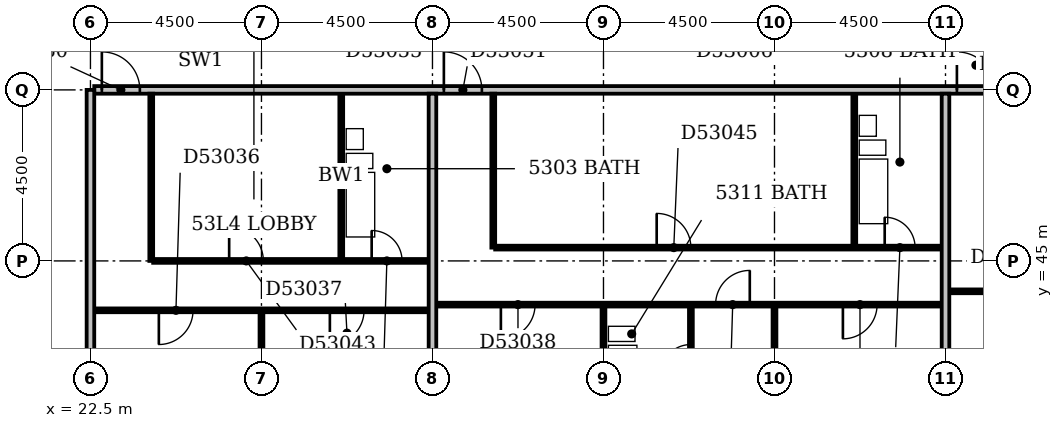
"""IFC4 building model, lengths in metres.
Left out: names, types, materials, properties, quantities, classifications, styles, units other than length and angle.
Written with IfcOpenShell. Run it as: python <this file> out.ifc"""

import sys

from ifc_helpers import new_model, si_unit, direction, frame, frame_2d, origin, place, context, subcontext, project, spatial, rectangle, extrude, element, fill, save


model = new_model("IFC4")
c1 = context("Model", 3, precision=1e-05, world=origin(), true_north=direction((0.0, 1.0)))
c2 = subcontext(c1, "Body", "Model", "MODEL_VIEW")
j1 = project(units=[si_unit("LENGTHUNIT", "METRE"), si_unit("PLANEANGLEUNIT", "RADIAN")], contexts=[c1])
p1 = place(None, origin())
s1 = spatial("IfcSite", under=j1, at=p1, CompositionType="ELEMENT")
p2 = place(p1, origin())
s2 = spatial("IfcBuilding", under=s1, at=p2, CompositionType="ELEMENT")
p3 = place(p2, frame((0.0, 0.0, 207.8)))
s3 = spatial("IfcBuildingStorey", under=s2, at=p3, CompositionType="ELEMENT", Elevation=207.8)
p4 = place(p3, frame((22.5, 36.45, 0.0), z_axis=(0.0, 0.0, 1.0), x_axis=(0.0, 1.0, 0.0)))
e1 = element("IfcWall", 1, at=p4, inside=s3, PredefinedType="PARTITIONING", context=c2, shape_type="SweptSolid", body=[
    extrude(rectangle(XDim=13.05, YDim=0.2, at=frame_2d((6.525, 0.0))), origin(), (0.0, 0.0, 1.0), 3.25),
])
p5 = place(p3, frame((27.0, 36.45, 0.0), z_axis=(0.0, 0.0, 1.0), x_axis=(0.0, 1.0, 0.0)))
e2 = element("IfcWall", 2, at=p5, inside=s3, PredefinedType="PARTITIONING", context=c2, shape_type="SweptSolid", body=[
    extrude(rectangle(XDim=7.2, YDim=0.1, at=frame_2d((3.6, 0.0))), origin(), (0.0, 0.0, 1.0), 2.35),
])
p6 = place(p3, frame((31.5, 36.45, 0.0), z_axis=(0.0, 0.0, 1.0), x_axis=(0.0, 1.0, 0.0)))
e3 = element("IfcWall", 3, at=p6, inside=s3, PredefinedType="PARTITIONING", context=c2, shape_type="SweptSolid", body=[
    extrude(rectangle(XDim=12.95, YDim=0.2, at=frame_2d((6.475, 0.0))), origin(), (0.0, 0.0, 1.0), 3.25),
])
p7 = place(p3, frame((36.0, 36.45, 0.0), z_axis=(0.0, 0.0, 1.0), x_axis=(0.0, 1.0, 0.0)))
e4 = element("IfcWall", 4, at=p7, inside=s3, PredefinedType="PARTITIONING", context=c2, shape_type="SweptSolid", body=[
    extrude(rectangle(XDim=7.35, YDim=0.1, at=frame_2d((3.675, 0.0))), origin(), (0.0, 0.0, 1.0), 2.35),
])
p8 = place(p3, frame((40.5, 36.45, 0.0), z_axis=(0.0, 0.0, 1.0), x_axis=(0.0, 1.0, 0.0)))
e5 = element("IfcWall", 5, at=p8, inside=s3, PredefinedType="PARTITIONING", context=c2, shape_type="SweptSolid", body=[
    extrude(rectangle(XDim=7.35, YDim=0.1, at=frame_2d((3.675, 0.0))), origin(), (0.0, 0.0, 1.0), 3.25),
])
p9 = place(p3, frame((45.0, 36.45, 0.0), z_axis=(0.0, 0.0, 1.0), x_axis=(0.0, 1.0, 0.0)))
e6 = element("IfcWall", 6, at=p9, inside=s3, PredefinedType="PARTITIONING", context=c2, shape_type="SweptSolid", body=[
    extrude(rectangle(XDim=12.95, YDim=0.2, at=frame_2d((6.475, 0.0))), origin(), (0.0, 0.0, 1.0), 2.55),
])
p10 = place(p3, frame((38.3, 40.95, 0.0), z_axis=(0.0, 0.0, 1.0), x_axis=(0.0, 1.0, 0.0)))
e7 = element("IfcWall", 7, at=p10, inside=s3, PredefinedType="PLUMBINGWALL", context=c2, shape_type="SweptSolid", body=[
    extrude(rectangle(XDim=2.85, YDim=0.1, at=frame_2d((1.425, 0.0))), origin(), (0.0, 0.0, 1.0), 3.25),
])
p11 = place(p10, frame((1.05, 0.0, 0.0)))
e8 = element("IfcOpeningElement", 8, at=p11, cuts=e7, PredefinedType="OPENING", context=c2, shape_type="SweptSolid", body=[
    extrude(rectangle(XDim=0.8, YDim=2.1, at=frame_2d((0.4, 1.05))), frame((0.0, 0.062, 0.0), z_axis=(0.0, -1.0, 0.0), x_axis=(1.0, 0.0, 0.0)), (0.0, 0.0, 1.0), 0.124),
])
p12 = place(p3, frame((22.6, 43.7, 0.0), z_axis=(0.0, 0.0, 1.0), x_axis=(1.0, 0.0, 0.0)))
e9 = element("IfcWall", 9, at=p12, inside=s3, PredefinedType="PARTITIONING", context=c2, shape_type="SweptSolid", body=[
    extrude(rectangle(XDim=8.8, YDim=0.1, at=frame_2d((4.4, 0.0))), origin(), (0.0, 0.0, 1.0), 3.25),
])
p13 = place(p12, frame((1.7, 0.0, 0.0)))
e10 = element("IfcOpeningElement", 10, at=p13, cuts=e9, PredefinedType="OPENING", context=c2, shape_type="SweptSolid", body=[
    extrude(rectangle(XDim=0.9, YDim=2.1, at=frame_2d((0.45, 1.05))), frame((0.0, 0.062, 0.0), z_axis=(0.0, -1.0, 0.0), x_axis=(1.0, 0.0, 0.0)), (0.0, 0.0, 1.0), 0.124),
])
p14 = place(p12, frame((6.2, 0.0, 0.0)))
e11 = element("IfcOpeningElement", 11, at=p14, cuts=e9, PredefinedType="OPENING", context=c2, shape_type="SweptSolid", body=[
    extrude(rectangle(XDim=0.9, YDim=2.1, at=frame_2d((0.45, 1.05))), frame((0.0, 0.062, 0.0), z_axis=(0.0, -1.0, 0.0), x_axis=(1.0, 0.0, 0.0)), (0.0, 0.0, 1.0), 0.124),
])
p15 = place(p3, frame((31.6, 43.85, 0.0), z_axis=(0.0, 0.0, 1.0), x_axis=(1.0, 0.0, 0.0)))
e12 = element("IfcWall", 12, at=p15, inside=s3, PredefinedType="PARTITIONING", context=c2, shape_type="SweptSolid", body=[
    extrude(rectangle(XDim=13.3, YDim=0.1, at=frame_2d((6.65, 0.0))), origin(), (0.0, 0.0, 1.0), 3.25),
])
p16 = place(p15, frame((1.7, 0.0, 0.0)))
e13 = element("IfcOpeningElement", 13, at=p16, cuts=e12, PredefinedType="OPENING", context=c2, shape_type="SweptSolid", body=[
    extrude(rectangle(XDim=0.9, YDim=2.1, at=frame_2d((0.45, 1.05))), frame((0.0, 0.062, 0.0), z_axis=(0.0, -1.0, 0.0), x_axis=(1.0, 0.0, 0.0)), (0.0, 0.0, 1.0), 0.124),
])
p17 = place(p15, frame((7.35, 0.0, 0.0)))
e14 = element("IfcOpeningElement", 14, at=p17, cuts=e12, PredefinedType="OPENING", context=c2, shape_type="SweptSolid", body=[
    extrude(rectangle(XDim=0.9, YDim=2.1, at=frame_2d((0.45, 1.05))), frame((0.0, 0.062, 0.0), z_axis=(0.0, -1.0, 0.0), x_axis=(1.0, 0.0, 0.0)), (0.0, 0.0, 1.0), 0.124),
])
p18 = place(p15, frame((10.7, 0.0, 0.0)))
e15 = element("IfcOpeningElement", 15, at=p18, cuts=e12, PredefinedType="OPENING", context=c2, shape_type="SweptSolid", body=[
    extrude(rectangle(XDim=0.9, YDim=2.1, at=frame_2d((0.45, 1.05))), frame((0.0, 0.062, 0.0), z_axis=(0.0, -1.0, 0.0), x_axis=(1.0, 0.0, 0.0)), (0.0, 0.0, 1.0), 0.124),
])
p19 = place(p3, frame((45.1, 44.2, 0.0), z_axis=(0.0, 0.0, 1.0), x_axis=(1.0, 0.0, 0.0)))
e16 = element("IfcWall", 16, at=p19, inside=s3, PredefinedType="PARTITIONING", context=c2, shape_type="SweptSolid", body=[
    extrude(rectangle(XDim=9.5, YDim=0.1, at=frame_2d((4.75, 0.0))), origin(), (0.0, 0.0, 1.0), 3.25),
])
p20 = place(p19, frame((3.95, 0.0, 0.0)))
e17 = element("IfcOpeningElement", 17, at=p20, cuts=e16, PredefinedType="OPENING", context=c2, shape_type="SweptSolid", body=[
    extrude(rectangle(XDim=0.9, YDim=2.1, at=frame_2d((0.45, 1.05))), frame((0.0, 0.062, 0.0), z_axis=(0.0, -1.0, 0.0), x_axis=(1.0, 0.0, 0.0)), (0.0, 0.0, 1.0), 0.124),
])
p21 = place(p3, frame((24.1, 45.0, 0.0), z_axis=(0.0, 0.0, 1.0), x_axis=(0.0, 1.0, 0.0)))
e18 = element("IfcWall", 18, at=p21, inside=s3, PredefinedType="PARTITIONING", context=c2, shape_type="SweptSolid", body=[
    extrude(rectangle(XDim=4.4, YDim=0.1, at=frame_2d((2.2, 0.0))), origin(), (0.0, 0.0, 1.0), 3.25),
])
p22 = place(p3, frame((24.15, 45.0, 0.0), z_axis=(0.0, 0.0, 1.0), x_axis=(1.0, 0.0, 0.0)))
e19 = element("IfcWall", 19, at=p22, inside=s3, PredefinedType="PARTITIONING", context=c2, shape_type="SweptSolid", body=[
    extrude(rectangle(XDim=7.25, YDim=0.1, at=frame_2d((3.625, 0.0))), origin(), (0.0, 0.0, 1.0), 3.25),
])
p23 = place(p22, frame((5.75, 0.0, 0.0)))
e20 = element("IfcOpeningElement", 20, at=p23, cuts=e19, PredefinedType="OPENING", context=c2, shape_type="SweptSolid", body=[
    extrude(rectangle(XDim=0.8, YDim=2.1, at=frame_2d((0.4, 1.05))), frame((0.0, 0.062, 0.0), z_axis=(0.0, -1.0, 0.0), x_axis=(1.0, 0.0, 0.0)), (0.0, 0.0, 1.0), 0.124),
])
p24 = place(p22, frame((2.0, 0.0, 0.0)))
e21 = element("IfcOpeningElement", 21, at=p24, cuts=e19, PredefinedType="OPENING", context=c2, shape_type="SweptSolid", body=[
    extrude(rectangle(XDim=0.9, YDim=2.1, at=frame_2d((0.45, 1.05))), frame((0.0, 0.062, 0.0), z_axis=(0.0, -1.0, 0.0), x_axis=(1.0, 0.0, 0.0)), (0.0, 0.0, 1.0), 0.124),
])
p25 = place(p3, frame((29.1, 45.05, 0.0), z_axis=(0.0, 0.0, 1.0), x_axis=(0.0, 1.0, 0.0)))
e22 = element("IfcWall", 22, at=p25, inside=s3, PredefinedType="PLUMBINGWALL", context=c2, shape_type="SweptSolid", body=[
    extrude(rectangle(XDim=4.35, YDim=0.1, at=frame_2d((2.175, 0.0))), origin(), (0.0, 0.0, 1.0), 3.25),
])
p26 = place(p3, frame((33.1, 45.35, 0.0), z_axis=(0.0, 0.0, 1.0), x_axis=(0.0, 1.0, 0.0)))
e23 = element("IfcWall", 23, at=p26, inside=s3, PredefinedType="PARTITIONING", context=c2, shape_type="SweptSolid", body=[
    extrude(rectangle(XDim=4.05, YDim=0.1, at=frame_2d((2.025, 0.0))), origin(), (0.0, 0.0, 1.0), 3.25),
])
p27 = place(p3, frame((33.15, 45.35, 0.0), z_axis=(0.0, 0.0, 1.0), x_axis=(1.0, 0.0, 0.0)))
e24 = element("IfcWall", 24, at=p27, inside=s3, PredefinedType="PARTITIONING", context=c2, shape_type="SweptSolid", body=[
    extrude(rectangle(XDim=11.75, YDim=0.1, at=frame_2d((5.875, 0.0))), origin(), (0.0, 0.0, 1.0), 3.25),
])
p28 = place(p27, frame((10.25, 0.0, 0.0)))
e25 = element("IfcOpeningElement", 25, at=p28, cuts=e24, PredefinedType="OPENING", context=c2, shape_type="SweptSolid", body=[
    extrude(rectangle(XDim=0.8, YDim=2.1, at=frame_2d((0.4, 1.05))), frame((0.0, 0.062, 0.0), z_axis=(0.0, -1.0, 0.0), x_axis=(1.0, 0.0, 0.0)), (0.0, 0.0, 1.0), 0.124),
])
p29 = place(p27, frame((4.25, 0.0, 0.0)))
e26 = element("IfcOpeningElement", 26, at=p29, cuts=e24, PredefinedType="OPENING", context=c2, shape_type="SweptSolid", body=[
    extrude(rectangle(XDim=0.9, YDim=2.1, at=frame_2d((0.45, 1.05))), frame((0.0, 0.062, 0.0), z_axis=(0.0, -1.0, 0.0), x_axis=(1.0, 0.0, 0.0)), (0.0, 0.0, 1.0), 0.124),
])
p30 = place(p3, frame((42.6, 45.4, 0.0), z_axis=(0.0, 0.0, 1.0), x_axis=(0.0, 1.0, 0.0)))
e27 = element("IfcWall", 27, at=p30, inside=s3, PredefinedType="PLUMBINGWALL", context=c2, shape_type="SweptSolid", body=[
    extrude(rectangle(XDim=4.0, YDim=0.1, at=frame_2d((2.0, 0.0))), origin(), (0.0, 0.0, 1.0), 3.25),
])
p31 = place(p3, frame((22.6, 49.5, 0.0), z_axis=(0.0, 0.0, 1.0), x_axis=(1.0, 0.0, 0.0)))
e28 = element("IfcWall", 28, at=p31, inside=s3, PredefinedType="PARTITIONING", context=c2, shape_type="SweptSolid", body=[
    extrude(rectangle(XDim=30.95, YDim=0.2, at=frame_2d((15.475, 0.0))), origin(), (0.0, 0.0, 1.0), 3.25),
])
p32 = place(p31, frame((0.2, 0.0, 0.0)))
e29 = element("IfcOpeningElement", 29, at=p32, cuts=e28, PredefinedType="OPENING", context=c2, shape_type="SweptSolid", body=[
    extrude(rectangle(XDim=1.0, YDim=2.1, at=frame_2d((0.5, 1.05))), frame((0.0, 0.112, 0.0), z_axis=(0.0, -1.0, 0.0), x_axis=(1.0, 0.0, 0.0)), (0.0, 0.0, 1.0), 0.224),
])
p33 = place(p31, frame((9.2, 0.0, 0.0)))
e30 = element("IfcOpeningElement", 30, at=p33, cuts=e28, PredefinedType="OPENING", context=c2, shape_type="SweptSolid", body=[
    extrude(rectangle(XDim=1.0, YDim=2.1, at=frame_2d((0.5, 1.05))), frame((0.0, 0.112, 0.0), z_axis=(0.0, -1.0, 0.0), x_axis=(1.0, 0.0, 0.0)), (0.0, 0.0, 1.0), 0.224),
])
p34 = place(p31, frame((22.7, 0.0, 0.0)))
e31 = element("IfcOpeningElement", 31, at=p34, cuts=e28, PredefinedType="OPENING", context=c2, shape_type="SweptSolid", body=[
    extrude(rectangle(XDim=1.0, YDim=2.1, at=frame_2d((0.5, 1.05))), frame((0.0, 0.112, 0.0), z_axis=(0.0, -1.0, 0.0), x_axis=(1.0, 0.0, 0.0)), (0.0, 0.0, 1.0), 0.224),
])
p35 = place(p11, origin())
e32 = element("IfcDoor", 32, at=p35, inside=s3, OperationType="SINGLE_SWING_LEFT", PredefinedType="DOOR", context=c2, shape_type="SweptSolid", body=[
    extrude(rectangle(XDim=0.8, YDim=2.1, at=frame_2d((0.4, 1.05))), frame((0.0, 0.025, 0.0), z_axis=(0.0, -1.0, 0.0), x_axis=(1.0, 0.0, 0.0)), (0.0, 0.0, 1.0), 0.05),
])
fill(e8, e32)
p36 = place(p13, frame((0.9, 0.0, 0.0), z_axis=(0.0, 0.0, 1.0), x_axis=(-1.0, 0.0, 0.0)))
e33 = element("IfcDoor", 33, at=p36, inside=s3, OperationType="SINGLE_SWING_RIGHT", PredefinedType="DOOR", context=c2, shape_type="SweptSolid", body=[
    extrude(rectangle(XDim=0.9, YDim=2.1, at=frame_2d((0.45, 1.05))), frame((0.0, 0.025, 0.0), z_axis=(0.0, -1.0, 0.0), x_axis=(1.0, 0.0, 0.0)), (0.0, 0.0, 1.0), 0.05),
])
fill(e10, e33)
p37 = place(p14, frame((0.9, 0.0, 0.0), z_axis=(0.0, 0.0, 1.0), x_axis=(-1.0, 0.0, 0.0)))
e34 = element("IfcDoor", 34, at=p37, inside=s3, OperationType="SINGLE_SWING_RIGHT", PredefinedType="DOOR", context=c2, shape_type="SweptSolid", body=[
    extrude(rectangle(XDim=0.9, YDim=2.1, at=frame_2d((0.45, 1.05))), frame((0.0, 0.025, 0.0), z_axis=(0.0, -1.0, 0.0), x_axis=(1.0, 0.0, 0.0)), (0.0, 0.0, 1.0), 0.05),
])
fill(e11, e34)
p38 = place(p16, frame((0.9, 0.0, 0.0), z_axis=(0.0, 0.0, 1.0), x_axis=(-1.0, 0.0, 0.0)))
e35 = element("IfcDoor", 35, at=p38, inside=s3, OperationType="SINGLE_SWING_RIGHT", PredefinedType="DOOR", context=c2, shape_type="SweptSolid", body=[
    extrude(rectangle(XDim=0.9, YDim=2.1, at=frame_2d((0.45, 1.05))), frame((0.0, 0.025, 0.0), z_axis=(0.0, -1.0, 0.0), x_axis=(1.0, 0.0, 0.0)), (0.0, 0.0, 1.0), 0.05),
])
fill(e13, e35)
p39 = place(p17, frame((0.9, 0.0, 0.0), z_axis=(0.0, 0.0, 1.0), x_axis=(-1.0, 0.0, 0.0)))
e36 = element("IfcDoor", 36, at=p39, inside=s3, OperationType="SINGLE_SWING_LEFT", PredefinedType="DOOR", context=c2, shape_type="SweptSolid", body=[
    extrude(rectangle(XDim=0.9, YDim=2.1, at=frame_2d((0.45, 1.05))), frame((0.0, 0.025, 0.0), z_axis=(0.0, -1.0, 0.0), x_axis=(1.0, 0.0, 0.0)), (0.0, 0.0, 1.0), 0.05),
])
fill(e14, e36)
p40 = place(p18, frame((0.9, 0.0, 0.0), z_axis=(0.0, 0.0, 1.0), x_axis=(-1.0, 0.0, 0.0)))
e37 = element("IfcDoor", 37, at=p40, inside=s3, OperationType="SINGLE_SWING_RIGHT", PredefinedType="DOOR", context=c2, shape_type="SweptSolid", body=[
    extrude(rectangle(XDim=0.9, YDim=2.1, at=frame_2d((0.45, 1.05))), frame((0.0, 0.025, 0.0), z_axis=(0.0, -1.0, 0.0), x_axis=(1.0, 0.0, 0.0)), (0.0, 0.0, 1.0), 0.05),
])
fill(e15, e37)
p41 = place(p23, origin())
e38 = element("IfcDoor", 38, at=p41, inside=s3, OperationType="SINGLE_SWING_LEFT", PredefinedType="DOOR", context=c2, shape_type="SweptSolid", body=[
    extrude(rectangle(XDim=0.8, YDim=2.1, at=frame_2d((0.4, 1.05))), frame((0.0, 0.025, 0.0), z_axis=(0.0, -1.0, 0.0), x_axis=(1.0, 0.0, 0.0)), (0.0, 0.0, 1.0), 0.05),
])
fill(e20, e38)
p42 = place(p24, origin())
e39 = element("IfcDoor", 39, at=p42, inside=s3, OperationType="SINGLE_SWING_LEFT", PredefinedType="DOOR", context=c2, shape_type="SweptSolid", body=[
    extrude(rectangle(XDim=0.9, YDim=2.1, at=frame_2d((0.45, 1.05))), frame((0.0, 0.025, 0.0), z_axis=(0.0, -1.0, 0.0), x_axis=(1.0, 0.0, 0.0)), (0.0, 0.0, 1.0), 0.05),
])
fill(e21, e39)
p43 = place(p28, origin())
e40 = element("IfcDoor", 40, at=p43, inside=s3, OperationType="SINGLE_SWING_LEFT", PredefinedType="DOOR", context=c2, shape_type="SweptSolid", body=[
    extrude(rectangle(XDim=0.8, YDim=2.1, at=frame_2d((0.4, 1.05))), frame((0.0, 0.025, 0.0), z_axis=(0.0, -1.0, 0.0), x_axis=(1.0, 0.0, 0.0)), (0.0, 0.0, 1.0), 0.05),
])
fill(e25, e40)
p44 = place(p29, origin())
e41 = element("IfcDoor", 41, at=p44, inside=s3, OperationType="SINGLE_SWING_LEFT", PredefinedType="DOOR", context=c2, shape_type="SweptSolid", body=[
    extrude(rectangle(XDim=0.9, YDim=2.1, at=frame_2d((0.45, 1.05))), frame((0.0, 0.025, 0.0), z_axis=(0.0, -1.0, 0.0), x_axis=(1.0, 0.0, 0.0)), (0.0, 0.0, 1.0), 0.05),
])
fill(e26, e41)
p45 = place(p32, origin())
e42 = element("IfcDoor", 42, at=p45, inside=s3, OperationType="SINGLE_SWING_LEFT", PredefinedType="DOOR", context=c2, shape_type="SweptSolid", body=[
    extrude(rectangle(XDim=1.0, YDim=2.1, at=frame_2d((0.5, 1.05))), frame((0.0, 0.025, 0.0), z_axis=(0.0, -1.0, 0.0), x_axis=(1.0, 0.0, 0.0)), (0.0, 0.0, 1.0), 0.05),
])
fill(e29, e42)
p46 = place(p33, origin())
e43 = element("IfcDoor", 43, at=p46, inside=s3, OperationType="SINGLE_SWING_LEFT", PredefinedType="DOOR", context=c2, shape_type="SweptSolid", body=[
    extrude(rectangle(XDim=1.0, YDim=2.1, at=frame_2d((0.5, 1.05))), frame((0.0, 0.025, 0.0), z_axis=(0.0, -1.0, 0.0), x_axis=(1.0, 0.0, 0.0)), (0.0, 0.0, 1.0), 0.05),
])
fill(e30, e43)
p47 = place(p34, origin())
e44 = element("IfcDoor", 44, at=p47, inside=s3, OperationType="SINGLE_SWING_LEFT", PredefinedType="DOOR", context=c2, shape_type="SweptSolid", body=[
    extrude(rectangle(XDim=1.0, YDim=2.1, at=frame_2d((0.5, 1.05))), frame((0.0, 0.025, 0.0), z_axis=(0.0, -1.0, 0.0), x_axis=(1.0, 0.0, 0.0)), (0.0, 0.0, 1.0), 0.05),
])
fill(e31, e44)
save(model, sys.argv[1])
